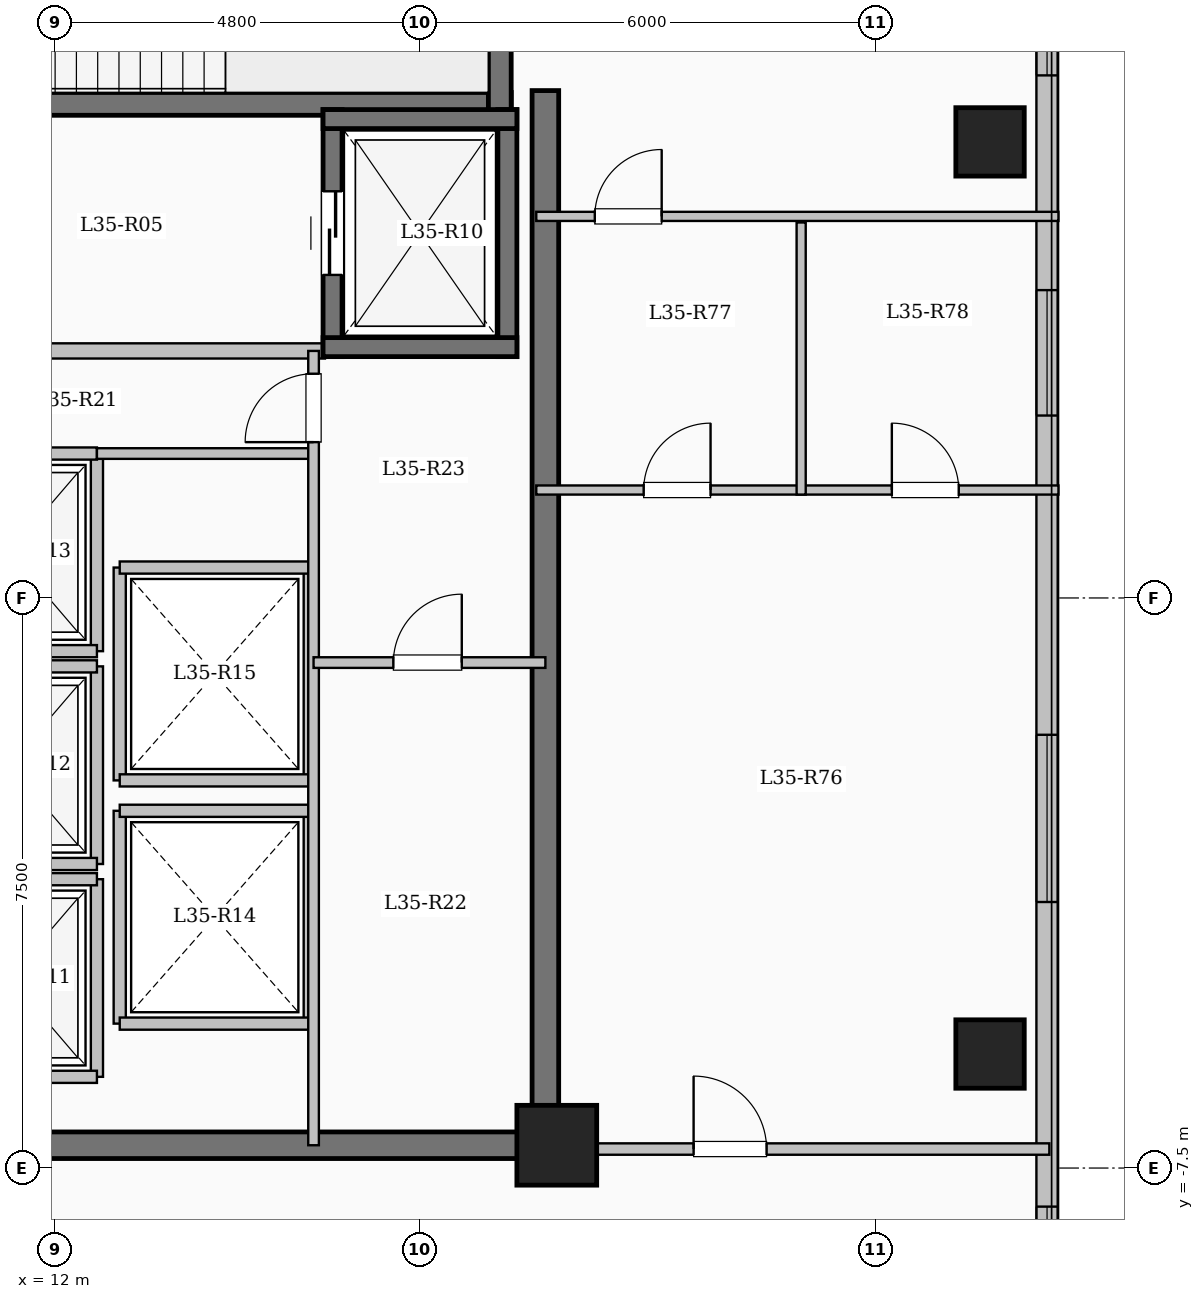
"""IFC4 building model, lengths in metres.
Left out: names, types, materials, properties, quantities, classifications, styles, units other than length and angle.
Written with IfcOpenShell. Run it as: python <this file> out.ifc"""

import sys

from ifc_helpers import new_model, si_unit, direction, frame, frame_2d, origin, origin_2d, place, context, subcontext, project, spatial, rectangle, extrude, element, fill, save


model = new_model("IFC4")
c1 = context("Model", 3, precision=1e-05, world=origin(), true_north=direction((0.0, 1.0)))
c2 = subcontext(c1, "Body", "Model", "MODEL_VIEW")
j1 = project(units=[si_unit("LENGTHUNIT", "METRE"), si_unit("PLANEANGLEUNIT", "RADIAN")], contexts=[c1])
p1 = place(None, origin())
s1 = spatial("IfcSite", under=j1, at=p1, CompositionType="ELEMENT")
p2 = place(p1, origin())
s2 = spatial("IfcBuilding", under=s1, at=p2, CompositionType="ELEMENT")
p3 = place(p2, frame((0.0, 0.0, 132.6)))
s3 = spatial("IfcBuildingStorey", under=s2, at=p3, CompositionType="ELEMENT", Elevation=132.6)
p4 = place(p3, frame((18.6, -7.2, 0.0), z_axis=(0.0, 0.0, 1.0), x_axis=(1.0, 0.0, 0.0)))
e1 = element("IfcColumn", 1, at=p4, inside=s3, PredefinedType="COLUMN", context=c2, shape_type="SweptSolid", body=[
    extrude(rectangle(XDim=1.05, YDim=1.05, at=origin_2d()), origin(), (0.0, 0.0, 1.0), 3.35),
])
for number, where, z_axis, x_axis in (
    (2, (24.3, -6.0, 0.0), (0.0, 0.0, 1.0), (1.0, 0.0, 0.0)),
    (3, (24.3, 6.0, 0.0), (0.0, 0.0, 1.0), (1.0, 0.0, 0.0)),
):
    element("IfcColumn", number, at=place(p3, frame(where, z_axis=z_axis, x_axis=x_axis)), inside=s3, PredefinedType="COLUMN", context=c2, shape_type="SweptSolid", body=[
        extrude(rectangle(XDim=0.9, YDim=0.9, at=origin_2d()), origin(), (0.0, 0.0, 1.0), 3.35),
    ])
p5 = place(p3, frame((25.05, 17.25, 0.0), z_axis=(0.0, 0.0, 1.0), x_axis=(0.0, -1.0, 0.0)))
e4 = element("IfcWall", 4, at=p5, inside=s3, PredefinedType="SOLIDWALL", context=c2, shape_type="SweptSolid", body=[
    extrude(rectangle(XDim=34.5, YDim=0.28, at=frame_2d((17.25, 0.0))), origin(), (0.0, 0.0, 1.0), 3.1),
])
p6 = place(p5, frame((1.375, 0.0, 0.9)))
e5 = element("IfcOpeningElement", 5, at=p6, cuts=e4, PredefinedType="OPENING", context=c2, shape_type="SweptSolid", body=[
    extrude(rectangle(XDim=2.0, YDim=1.7, at=frame_2d((1.0, 0.85))), frame((0.0, 0.15, 0.0), z_axis=(0.0, -1.0, 0.0), x_axis=(1.0, 0.0, 0.0)), (0.0, 0.0, 1.0), 0.3),
])
p7 = place(p5, frame((5.125, 0.0, 0.95)))
e6 = element("IfcOpeningElement", 6, at=p7, cuts=e4, PredefinedType="OPENING", context=c2, shape_type="SweptSolid", body=[
    extrude(rectangle(XDim=1.0, YDim=1.5, at=frame_2d((0.5, 0.75))), frame((0.0, 0.15, 0.0), z_axis=(0.0, -1.0, 0.0), x_axis=(1.0, 0.0, 0.0)), (0.0, 0.0, 1.0), 0.3),
])
p8 = place(p5, frame((8.375, 0.0, 0.9)))
e7 = element("IfcOpeningElement", 7, at=p8, cuts=e4, PredefinedType="OPENING", context=c2, shape_type="SweptSolid", body=[
    extrude(rectangle(XDim=2.0, YDim=1.7, at=frame_2d((1.0, 0.85))), frame((0.0, 0.15, 0.0), z_axis=(0.0, -1.0, 0.0), x_axis=(1.0, 0.0, 0.0)), (0.0, 0.0, 1.0), 0.3),
])
p9 = place(p5, frame((13.2, 0.0, 0.9)))
e8 = element("IfcOpeningElement", 8, at=p9, cuts=e4, PredefinedType="OPENING", context=c2, shape_type="SweptSolid", body=[
    extrude(rectangle(XDim=1.65, YDim=1.6, at=frame_2d((0.825, 0.8))), frame((0.0, 0.15, 0.0), z_axis=(0.0, -1.0, 0.0), x_axis=(1.0, 0.0, 0.0)), (0.0, 0.0, 1.0), 0.3),
])
p10 = place(p5, frame((19.05, 0.0, 0.9)))
e9 = element("IfcOpeningElement", 9, at=p10, cuts=e4, PredefinedType="OPENING", context=c2, shape_type="SweptSolid", body=[
    extrude(rectangle(XDim=2.2, YDim=1.75, at=frame_2d((1.1, 0.875))), frame((0.0, 0.15, 0.0), z_axis=(0.0, -1.0, 0.0), x_axis=(1.0, 0.0, 0.0)), (0.0, 0.0, 1.0), 0.3),
])
p11 = place(p5, frame((25.258, 0.0, 0.9)))
e10 = element("IfcOpeningElement", 10, at=p11, cuts=e4, PredefinedType="OPENING", context=c2, shape_type="SweptSolid", body=[
    extrude(rectangle(XDim=1.5, YDim=1.65, at=frame_2d((0.75, 0.825))), frame((0.0, 0.15, 0.0), z_axis=(0.0, -1.0, 0.0), x_axis=(1.0, 0.0, 0.0)), (0.0, 0.0, 1.0), 0.3),
])
p12 = place(p5, frame((29.95, 0.0, 0.9)))
e11 = element("IfcOpeningElement", 11, at=p12, cuts=e4, PredefinedType="OPENING", context=c2, shape_type="SweptSolid", body=[
    extrude(rectangle(XDim=2.2, YDim=1.75, at=frame_2d((1.1, 0.875))), frame((0.0, 0.15, 0.0), z_axis=(0.0, -1.0, 0.0), x_axis=(1.0, 0.0, 0.0)), (0.0, 0.0, 1.0), 0.3),
])
p13 = place(p3, frame((10.0, 6.5, 0.0), z_axis=(0.0, 0.0, 1.0), x_axis=(1.0, 0.0, 0.0)))
e12 = element("IfcWall", 12, at=p13, inside=s3, PredefinedType="SHEAR", context=c2, shape_type="SweptSolid", body=[
    extrude(rectangle(XDim=8.0, YDim=0.3, at=frame_2d((4.0, 0.0))), origin(), (0.0, 0.0, 1.0), 3.35),
])
p14 = place(p13, frame((0.55, 0.0, 0.0)))
e13 = element("IfcOpeningElement", 13, at=p14, cuts=e12, PredefinedType="OPENING", context=c2, shape_type="SweptSolid", body=[
    extrude(rectangle(XDim=1.0, YDim=2.15, at=frame_2d((0.5, 1.075))), frame((0.0, 0.16, 0.0), z_axis=(0.0, -1.0, 0.0), x_axis=(1.0, 0.0, 0.0)), (0.0, 0.0, 1.0), 0.32),
])
p15 = place(p3, frame((17.85, 6.35, 0.0), z_axis=(0.0, 0.0, 1.0), x_axis=(0.0, 1.0, 0.0)))
e14 = element("IfcWall", 14, at=p15, inside=s3, PredefinedType="SHEAR", context=c2, shape_type="SweptSolid", body=[
    extrude(rectangle(XDim=3.59, YDim=0.3, at=frame_2d((1.795, 0.0))), origin(), (0.0, 0.0, 1.0), 3.35),
])
p16 = place(p3, frame((10.15, 3.25, 0.0), z_axis=(0.0, 0.0, 1.0), x_axis=(1.0, 0.0, 0.0)))
e15 = element("IfcWall", 15, at=p16, inside=s3, PredefinedType="SOLIDWALL", context=c2, shape_type="SweptSolid", body=[
    extrude(rectangle(XDim=5.4, YDim=0.2, at=frame_2d((2.7, 0.0))), origin(), (0.0, 0.0, 1.0), 3.1),
])
p17 = place(p3, frame((15.65, 3.175, 0.0), z_axis=(0.0, 0.0, 1.0), x_axis=(0.0, 1.0, 0.0)))
e16 = element("IfcWall", 16, at=p17, inside=s3, PredefinedType="SHEAR", context=c2, shape_type="SweptSolid", body=[
    extrude(rectangle(XDim=3.25, YDim=0.25, at=frame_2d((1.625, 0.0))), origin(), (0.0, 0.0, 1.0), 3.35),
])
p18 = place(p17, frame((1.075, 0.0, 0.0)))
e17 = element("IfcOpeningElement", 17, at=p18, cuts=e16, PredefinedType="OPENING", context=c2, shape_type="SweptSolid", body=[
    extrude(rectangle(XDim=1.1, YDim=2.15, at=frame_2d((0.55, 1.075))), frame((0.0, 0.135, 0.0), z_axis=(0.0, -1.0, 0.0), x_axis=(1.0, 0.0, 0.0)), (0.0, 0.0, 1.0), 0.27),
])
p19 = place(p3, frame((17.95, 3.175, 0.0), z_axis=(0.0, 0.0, 1.0), x_axis=(0.0, 1.0, 0.0)))
e18 = element("IfcWall", 18, at=p19, inside=s3, PredefinedType="SHEAR", context=c2, shape_type="SweptSolid", body=[
    extrude(rectangle(XDim=3.25, YDim=0.25, at=frame_2d((1.625, 0.0))), origin(), (0.0, 0.0, 1.0), 3.35),
])
for number, where, z_axis, x_axis in (
    (19, (15.525, 3.3, 0.0), (0.0, 0.0, 1.0), (1.0, 0.0, 0.0)),
    (20, (15.525, 6.3, 0.0), (0.0, 0.0, 1.0), (1.0, 0.0, 0.0)),
):
    element("IfcWall", number, at=place(p3, frame(where, z_axis=z_axis, x_axis=x_axis)), inside=s3, PredefinedType="SHEAR", context=c2, shape_type="SweptSolid", body=[
        extrude(rectangle(XDim=2.55, YDim=0.25, at=frame_2d((1.275, 0.0))), origin(), (0.0, 0.0, 1.0), 3.35),
    ])
p20 = place(p3, frame((12.55, -6.3, 0.0), z_axis=(0.0, 0.0, 1.0), x_axis=(0.0, 1.0, 0.0)))
e21 = element("IfcWall", 21, at=p20, inside=s3, PredefinedType="SOLIDWALL", context=c2, shape_type="SweptSolid", body=[
    extrude(rectangle(XDim=2.6, YDim=0.16, at=frame_2d((1.3, 0.0))), origin(), (0.0, 0.0, 1.0), 3.1),
])
for number, where, z_axis, x_axis in (
    (22, (10.25, -6.3, 0.0), (0.0, 0.0, 1.0), (1.0, 0.0, 0.0)),
    (23, (10.25, -3.7, 0.0), (0.0, 0.0, 1.0), (1.0, 0.0, 0.0)),
):
    element("IfcWall", number, at=place(p3, frame(where, z_axis=z_axis, x_axis=x_axis)), inside=s3, PredefinedType="SOLIDWALL", context=c2, shape_type="SweptSolid", body=[
        extrude(rectangle(XDim=2.3, YDim=0.16, at=frame_2d((1.15, 0.0))), origin(), (0.0, 0.0, 1.0), 3.1),
    ])
p21 = place(p3, frame((12.55, -3.5, 0.0), z_axis=(0.0, 0.0, 1.0), x_axis=(0.0, 1.0, 0.0)))
e24 = element("IfcWall", 24, at=p21, inside=s3, PredefinedType="SOLIDWALL", context=c2, shape_type="SweptSolid", body=[
    extrude(rectangle(XDim=2.6, YDim=0.16, at=frame_2d((1.3, 0.0))), origin(), (0.0, 0.0, 1.0), 3.1),
])
for number, where, z_axis, x_axis in (
    (25, (10.25, -3.5, 0.0), (0.0, 0.0, 1.0), (1.0, 0.0, 0.0)),
    (26, (10.25, -0.9, 0.0), (0.0, 0.0, 1.0), (1.0, 0.0, 0.0)),
):
    element("IfcWall", number, at=place(p3, frame(where, z_axis=z_axis, x_axis=x_axis)), inside=s3, PredefinedType="SOLIDWALL", context=c2, shape_type="SweptSolid", body=[
        extrude(rectangle(XDim=2.3, YDim=0.16, at=frame_2d((1.15, 0.0))), origin(), (0.0, 0.0, 1.0), 3.1),
    ])
p22 = place(p3, frame((12.55, -0.7, 0.0), z_axis=(0.0, 0.0, 1.0), x_axis=(0.0, 1.0, 0.0)))
e27 = element("IfcWall", 27, at=p22, inside=s3, PredefinedType="SOLIDWALL", context=c2, shape_type="SweptSolid", body=[
    extrude(rectangle(XDim=2.6, YDim=0.16, at=frame_2d((1.3, 0.0))), origin(), (0.0, 0.0, 1.0), 3.1),
])
for number, where, z_axis, x_axis in (
    (28, (10.25, -0.7, 0.0), (0.0, 0.0, 1.0), (1.0, 0.0, 0.0)),
    (29, (10.25, 1.9, 0.0), (0.0, 0.0, 1.0), (1.0, 0.0, 0.0)),
):
    element("IfcWall", number, at=place(p3, frame(where, z_axis=z_axis, x_axis=x_axis)), inside=s3, PredefinedType="SOLIDWALL", context=c2, shape_type="SweptSolid", body=[
        extrude(rectangle(XDim=2.3, YDim=0.16, at=frame_2d((1.15, 0.0))), origin(), (0.0, 0.0, 1.0), 3.1),
    ])
for number, where, z_axis, x_axis in (
    (30, (12.85, -5.6, 0.0), (0.0, 0.0, 1.0), (0.0, 1.0, 0.0)),
    (31, (15.35, -5.6, 0.0), (0.0, 0.0, 1.0), (0.0, 1.0, 0.0)),
):
    element("IfcWall", number, at=place(p3, frame(where, z_axis=z_axis, x_axis=x_axis)), inside=s3, PredefinedType="SOLIDWALL", context=c2, shape_type="SweptSolid", body=[
        extrude(rectangle(XDim=2.8, YDim=0.16, at=frame_2d((1.4, 0.0))), origin(), (0.0, 0.0, 1.0), 3.1),
    ])
for number, where, z_axis, x_axis in (
    (32, (12.85, -5.6, 0.0), (0.0, 0.0, 1.0), (1.0, 0.0, 0.0)),
    (33, (12.85, -2.8, 0.0), (0.0, 0.0, 1.0), (1.0, 0.0, 0.0)),
):
    element("IfcWall", number, at=place(p3, frame(where, z_axis=z_axis, x_axis=x_axis)), inside=s3, PredefinedType="SOLIDWALL", context=c2, shape_type="SweptSolid", body=[
        extrude(rectangle(XDim=2.5, YDim=0.16, at=frame_2d((1.25, 0.0))), origin(), (0.0, 0.0, 1.0), 3.1),
    ])
for number, where, z_axis, x_axis in (
    (34, (12.85, -2.4, 0.0), (0.0, 0.0, 1.0), (0.0, 1.0, 0.0)),
    (35, (15.35, -2.4, 0.0), (0.0, 0.0, 1.0), (0.0, 1.0, 0.0)),
):
    element("IfcWall", number, at=place(p3, frame(where, z_axis=z_axis, x_axis=x_axis)), inside=s3, PredefinedType="SOLIDWALL", context=c2, shape_type="SweptSolid", body=[
        extrude(rectangle(XDim=2.8, YDim=0.16, at=frame_2d((1.4, 0.0))), origin(), (0.0, 0.0, 1.0), 3.1),
    ])
for number, where, z_axis, x_axis in (
    (36, (12.85, -2.4, 0.0), (0.0, 0.0, 1.0), (1.0, 0.0, 0.0)),
    (37, (12.85, 0.4, 0.0), (0.0, 0.0, 1.0), (1.0, 0.0, 0.0)),
):
    element("IfcWall", number, at=place(p3, frame(where, z_axis=z_axis, x_axis=x_axis)), inside=s3, PredefinedType="SOLIDWALL", context=c2, shape_type="SweptSolid", body=[
        extrude(rectangle(XDim=2.5, YDim=0.16, at=frame_2d((1.25, 0.0))), origin(), (0.0, 0.0, 1.0), 3.1),
    ])
p23 = place(p3, frame((18.45, -7.375, 0.0), z_axis=(0.0, 0.0, 1.0), x_axis=(0.0, 1.0, 0.0)))
e38 = element("IfcWall", 38, at=p23, inside=s3, PredefinedType="SHEAR", context=c2, shape_type="SweptSolid", body=[
    extrude(rectangle(XDim=14.05, YDim=0.35, at=frame_2d((7.025, 0.0))), origin(), (0.0, 0.0, 1.0), 3.35),
])
p24 = place(p3, frame((10.075, -7.2, 0.0), z_axis=(0.0, 0.0, 1.0), x_axis=(1.0, 0.0, 0.0)))
e39 = element("IfcWall", 39, at=p24, inside=s3, PredefinedType="SHEAR", context=c2, shape_type="SweptSolid", body=[
    extrude(rectangle(XDim=8.55, YDim=0.35, at=frame_2d((4.275, 0.0))), origin(), (0.0, 0.0, 1.0), 3.35),
])
p25 = place(p3, frame((12.55, 1.9, 0.0), z_axis=(0.0, 0.0, 1.0), x_axis=(1.0, 0.0, 0.0)))
e40 = element("IfcWall", 40, at=p25, inside=s3, PredefinedType="PARTITIONING", context=c2, shape_type="SweptSolid", body=[
    extrude(rectangle(XDim=2.85, YDim=0.14, at=frame_2d((1.425, 0.0))), origin(), (0.0, 0.0, 1.0), 3.1),
])
p26 = place(p3, frame((15.4, -7.2, 0.0), z_axis=(0.0, 0.0, 1.0), x_axis=(0.0, 1.0, 0.0)))
e41 = element("IfcWall", 41, at=p26, inside=s3, PredefinedType="PARTITIONING", context=c2, shape_type="SweptSolid", body=[
    extrude(rectangle(XDim=10.45, YDim=0.14, at=frame_2d((5.225, 0.0))), origin(), (0.0, 0.0, 1.0), 3.1),
])
p27 = place(p26, frame((9.25, 0.0, 0.0)))
e42 = element("IfcOpeningElement", 42, at=p27, cuts=e41, PredefinedType="OPENING", context=c2, shape_type="SweptSolid", body=[
    extrude(rectangle(XDim=0.9, YDim=2.08, at=frame_2d((0.45, 1.04))), frame((0.0, 0.08, 0.0), z_axis=(0.0, -1.0, 0.0), x_axis=(1.0, 0.0, 0.0)), (0.0, 0.0, 1.0), 0.16),
])
p28 = place(p3, frame((15.4, -0.85, 0.0), z_axis=(0.0, 0.0, 1.0), x_axis=(1.0, 0.0, 0.0)))
e43 = element("IfcWall", 43, at=p28, inside=s3, PredefinedType="PARTITIONING", context=c2, shape_type="SweptSolid", body=[
    extrude(rectangle(XDim=3.05, YDim=0.14, at=frame_2d((1.525, 0.0))), origin(), (0.0, 0.0, 1.0), 3.1),
])
p29 = place(p28, frame((1.05, 0.0, 0.0)))
e44 = element("IfcOpeningElement", 44, at=p29, cuts=e43, PredefinedType="OPENING", context=c2, shape_type="SweptSolid", body=[
    extrude(rectangle(XDim=0.9, YDim=2.08, at=frame_2d((0.45, 1.04))), frame((0.0, 0.08, 0.0), z_axis=(0.0, -1.0, 0.0), x_axis=(1.0, 0.0, 0.0)), (0.0, 0.0, 1.0), 0.16),
])
p30 = place(p3, frame((18.45, -7.25, 0.0), z_axis=(0.0, 0.0, 1.0), x_axis=(1.0, 0.0, 0.0)))
e45 = element("IfcWall", 45, at=p30, inside=s3, PredefinedType="PARTITIONING", context=c2, shape_type="SweptSolid", body=[
    extrude(rectangle(XDim=6.63, YDim=0.15, at=frame_2d((3.315, 0.0))), origin(), (0.0, 0.0, 1.0), 3.1),
])
p31 = place(p30, frame((1.95, 0.0, 0.0)))
e46 = element("IfcOpeningElement", 46, at=p31, cuts=e45, PredefinedType="OPENING", context=c2, shape_type="SweptSolid", body=[
    extrude(rectangle(XDim=0.96, YDim=2.15, at=frame_2d((0.48, 1.075))), frame((0.0, 0.085, 0.0), z_axis=(0.0, -1.0, 0.0), x_axis=(1.0, 0.0, 0.0)), (0.0, 0.0, 1.0), 0.17),
])
p32 = place(p3, frame((18.33, 1.42, 0.0), z_axis=(0.0, 0.0, 1.0), x_axis=(1.0, 0.0, 0.0)))
e47 = element("IfcWall", 47, at=p32, inside=s3, PredefinedType="PARTITIONING", context=c2, shape_type="SweptSolid", body=[
    extrude(rectangle(XDim=6.87, YDim=0.12, at=frame_2d((3.435, 0.0))), origin(), (0.0, 0.0, 1.0), 3.1),
])
p33 = place(p32, frame((1.413, 0.0, 0.0)))
e48 = element("IfcOpeningElement", 48, at=p33, cuts=e47, PredefinedType="OPENING", context=c2, shape_type="SweptSolid", body=[
    extrude(rectangle(XDim=0.88, YDim=2.1, at=frame_2d((0.44, 1.05))), frame((0.0, 0.07, 0.0), z_axis=(0.0, -1.0, 0.0), x_axis=(1.0, 0.0, 0.0)), (0.0, 0.0, 1.0), 0.14),
])
p34 = place(p32, frame((4.678, 0.0, 0.0)))
e49 = element("IfcOpeningElement", 49, at=p34, cuts=e47, PredefinedType="OPENING", context=c2, shape_type="SweptSolid", body=[
    extrude(rectangle(XDim=0.88, YDim=2.1, at=frame_2d((0.44, 1.05))), frame((0.0, 0.07, 0.0), z_axis=(0.0, -1.0, 0.0), x_axis=(1.0, 0.0, 0.0)), (0.0, 0.0, 1.0), 0.14),
])
p35 = place(p3, frame((18.33, 5.02, 0.0), z_axis=(0.0, 0.0, 1.0), x_axis=(1.0, 0.0, 0.0)))
e50 = element("IfcWall", 50, at=p35, inside=s3, PredefinedType="PARTITIONING", context=c2, shape_type="SweptSolid", body=[
    extrude(rectangle(XDim=6.87, YDim=0.12, at=frame_2d((3.435, 0.0))), origin(), (0.0, 0.0, 1.0), 3.1),
])
p36 = place(p35, frame((0.77, 0.0, 0.0)))
e51 = element("IfcOpeningElement", 51, at=p36, cuts=e50, PredefinedType="OPENING", context=c2, shape_type="SweptSolid", body=[
    extrude(rectangle(XDim=0.88, YDim=2.1, at=frame_2d((0.44, 1.05))), frame((0.0, 0.07, 0.0), z_axis=(0.0, -1.0, 0.0), x_axis=(1.0, 0.0, 0.0)), (0.0, 0.0, 1.0), 0.14),
])
p37 = place(p3, frame((21.815, 1.36, 0.0), z_axis=(0.0, 0.0, 1.0), x_axis=(0.0, 1.0, 0.0)))
e52 = element("IfcWall", 52, at=p37, inside=s3, PredefinedType="PARTITIONING", context=c2, shape_type="SweptSolid", body=[
    extrude(rectangle(XDim=3.58, YDim=0.12, at=frame_2d((1.79, 0.0))), origin(), (0.0, 0.0, 1.0), 3.1),
])
p38 = place(p8, origin())
e53 = element("IfcWindow", 53, at=p38, inside=s3, PartitioningType="SINGLE_PANEL", PredefinedType="WINDOW", context=c2, shape_type="SweptSolid", body=[
    extrude(rectangle(XDim=2.0, YDim=1.7, at=frame_2d((1.0, 0.85))), frame((0.0, 0.03, 0.0), z_axis=(0.0, -1.0, 0.0), x_axis=(1.0, 0.0, 0.0)), (0.0, 0.0, 1.0), 0.06),
])
fill(e7, e53)
p39 = place(p9, origin())
e54 = element("IfcWindow", 54, at=p39, inside=s3, PartitioningType="SINGLE_PANEL", PredefinedType="WINDOW", context=c2, shape_type="SweptSolid", body=[
    extrude(rectangle(XDim=1.65, YDim=1.6, at=frame_2d((0.825, 0.8))), frame((0.0, 0.03, 0.0), z_axis=(0.0, -1.0, 0.0), x_axis=(1.0, 0.0, 0.0)), (0.0, 0.0, 1.0), 0.06),
])
fill(e8, e54)
p40 = place(p10, origin())
e55 = element("IfcWindow", 55, at=p40, inside=s3, PartitioningType="SINGLE_PANEL", PredefinedType="WINDOW", context=c2, shape_type="SweptSolid", body=[
    extrude(rectangle(XDim=2.2, YDim=1.75, at=frame_2d((1.1, 0.875))), frame((0.0, 0.03, 0.0), z_axis=(0.0, -1.0, 0.0), x_axis=(1.0, 0.0, 0.0)), (0.0, 0.0, 1.0), 0.06),
])
fill(e9, e55)
p41 = place(p11, origin())
e56 = element("IfcWindow", 56, at=p41, inside=s3, PartitioningType="SINGLE_PANEL", PredefinedType="WINDOW", context=c2, shape_type="SweptSolid", body=[
    extrude(rectangle(XDim=1.5, YDim=1.65, at=frame_2d((0.75, 0.825))), frame((0.0, 0.03, 0.0), z_axis=(0.0, -1.0, 0.0), x_axis=(1.0, 0.0, 0.0)), (0.0, 0.0, 1.0), 0.06),
])
fill(e10, e56)
p42 = place(p18, origin())
e57 = element("IfcDoor", 57, at=p42, inside=s3, OperationType="SLIDING_TO_LEFT", PredefinedType="DOOR", context=c2, shape_type="SweptSolid", body=[
    extrude(rectangle(XDim=1.1, YDim=2.15, at=frame_2d((0.55, 1.075))), frame((0.0, 0.025, 0.0), z_axis=(0.0, -1.0, 0.0), x_axis=(1.0, 0.0, 0.0)), (0.0, 0.0, 1.0), 0.05),
])
fill(e17, e57)
p43 = place(p27, origin())
e58 = element("IfcDoor", 58, at=p43, inside=s3, OperationType="SINGLE_SWING_LEFT", PredefinedType="DOOR", context=c2, shape_type="SweptSolid", body=[
    extrude(rectangle(XDim=0.9, YDim=2.08, at=frame_2d((0.45, 1.04))), frame((0.0, 0.025, 0.0), z_axis=(0.0, -1.0, 0.0), x_axis=(1.0, 0.0, 0.0)), (0.0, 0.0, 1.0), 0.05),
])
fill(e42, e58)
p44 = place(p29, origin())
e59 = element("IfcDoor", 59, at=p44, inside=s3, OperationType="SINGLE_SWING_RIGHT", PredefinedType="DOOR", context=c2, shape_type="SweptSolid", body=[
    extrude(rectangle(XDim=0.9, YDim=2.08, at=frame_2d((0.45, 1.04))), frame((0.0, 0.025, 0.0), z_axis=(0.0, -1.0, 0.0), x_axis=(1.0, 0.0, 0.0)), (0.0, 0.0, 1.0), 0.05),
])
fill(e44, e59)
p45 = place(p31, origin())
e60 = element("IfcDoor", 60, at=p45, inside=s3, OperationType="SINGLE_SWING_LEFT", PredefinedType="DOOR", context=c2, shape_type="SweptSolid", body=[
    extrude(rectangle(XDim=0.96, YDim=2.15, at=frame_2d((0.48, 1.075))), frame((0.0, 0.025, 0.0), z_axis=(0.0, -1.0, 0.0), x_axis=(1.0, 0.0, 0.0)), (0.0, 0.0, 1.0), 0.05),
])
fill(e46, e60)
p46 = place(p33, origin())
e61 = element("IfcDoor", 61, at=p46, inside=s3, OperationType="SINGLE_SWING_RIGHT", PredefinedType="DOOR", context=c2, shape_type="SweptSolid", body=[
    extrude(rectangle(XDim=0.88, YDim=2.1, at=frame_2d((0.44, 1.05))), frame((0.0, 0.025, 0.0), z_axis=(0.0, -1.0, 0.0), x_axis=(1.0, 0.0, 0.0)), (0.0, 0.0, 1.0), 0.05),
])
fill(e48, e61)
p47 = place(p34, origin())
e62 = element("IfcDoor", 62, at=p47, inside=s3, OperationType="SINGLE_SWING_LEFT", PredefinedType="DOOR", context=c2, shape_type="SweptSolid", body=[
    extrude(rectangle(XDim=0.88, YDim=2.1, at=frame_2d((0.44, 1.05))), frame((0.0, 0.025, 0.0), z_axis=(0.0, -1.0, 0.0), x_axis=(1.0, 0.0, 0.0)), (0.0, 0.0, 1.0), 0.05),
])
fill(e49, e62)
p48 = place(p36, origin())
e63 = element("IfcDoor", 63, at=p48, inside=s3, OperationType="SINGLE_SWING_RIGHT", PredefinedType="DOOR", context=c2, shape_type="SweptSolid", body=[
    extrude(rectangle(XDim=0.88, YDim=2.1, at=frame_2d((0.44, 1.05))), frame((0.0, 0.025, 0.0), z_axis=(0.0, -1.0, 0.0), x_axis=(1.0, 0.0, 0.0)), (0.0, 0.0, 1.0), 0.05),
])
fill(e51, e63)
save(model, sys.argv[1])
